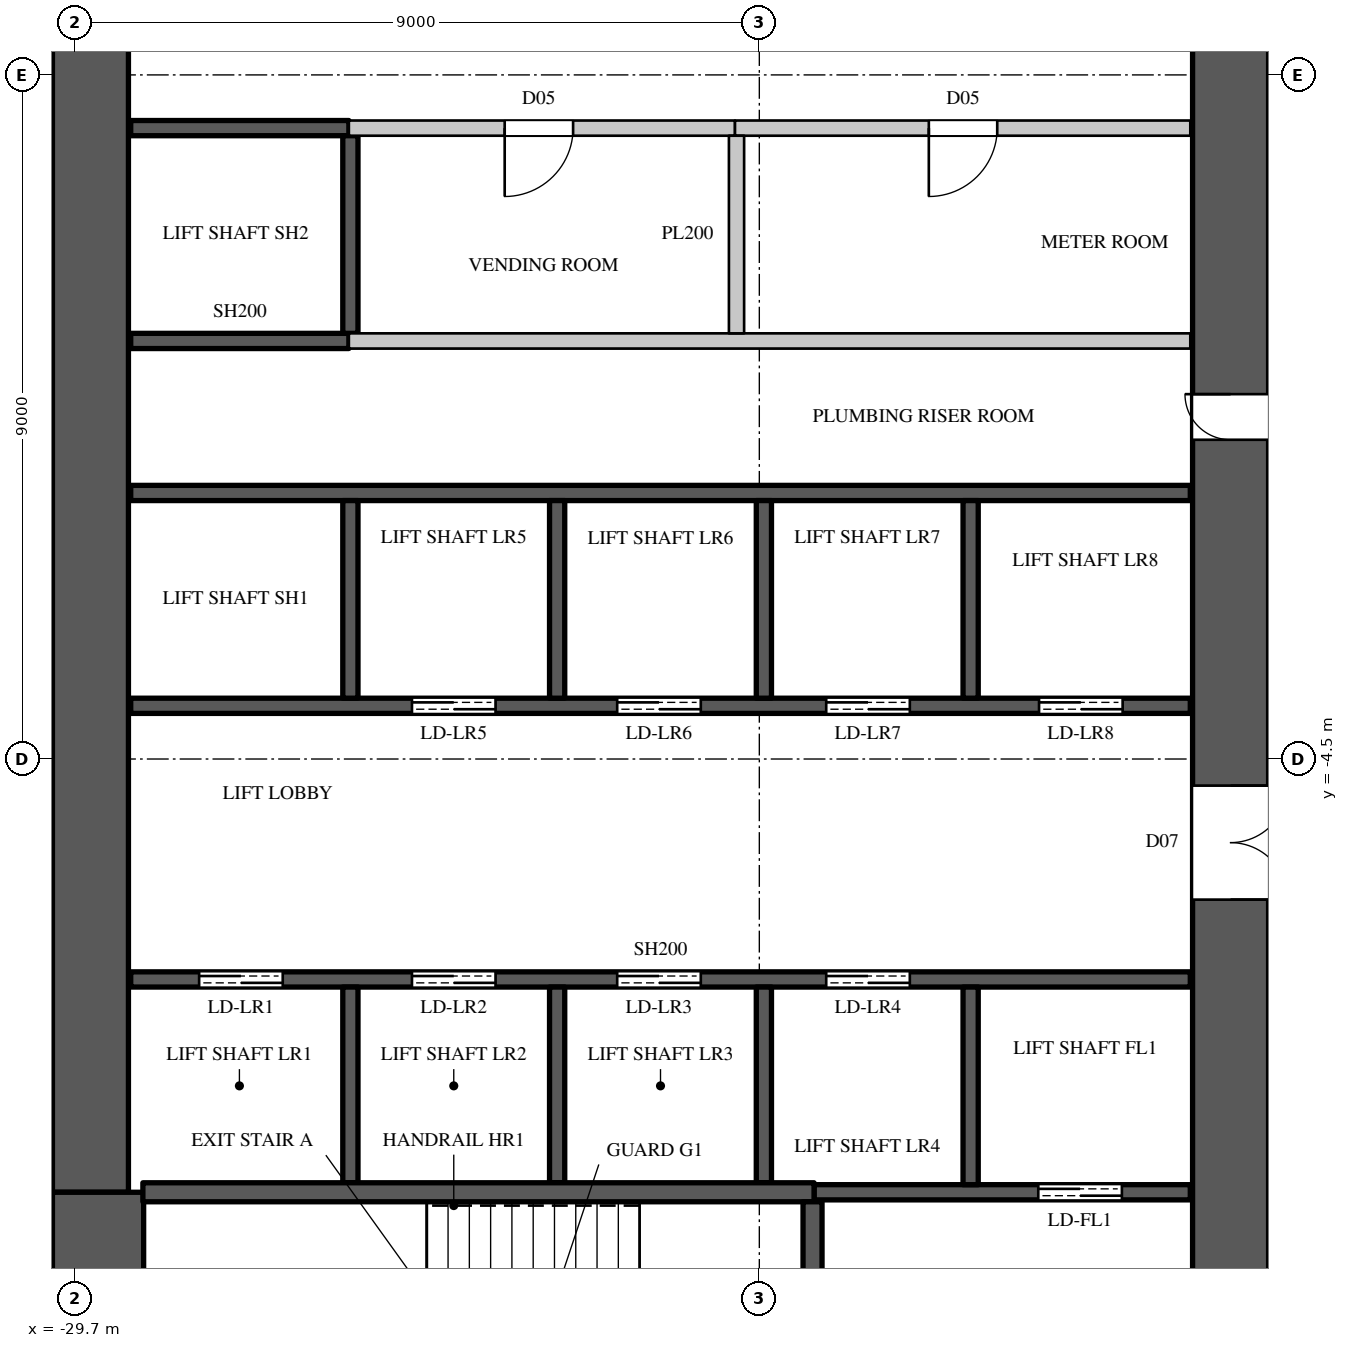
"""IFC4 building model, lengths in metres.
Left out: names, types, materials, properties, quantities, classifications, styles, units other than length and angle.
Written with IfcOpenShell. Run it as: python <this file> out.ifc"""

import sys

from ifc_helpers import new_model, si_unit, direction, frame, frame_2d, origin, place, context, subcontext, project, spatial, rectangle, extrude, element, fill, save


model = new_model("IFC4")
c1 = context("Model", 3, precision=1e-05, world=origin(), true_north=direction((0.0, 1.0)))
c2 = subcontext(c1, "Body", "Model", "MODEL_VIEW")
j1 = project(units=[si_unit("LENGTHUNIT", "METRE"), si_unit("PLANEANGLEUNIT", "RADIAN")], contexts=[c1])
p1 = place(None, origin())
s1 = spatial("IfcSite", under=j1, at=p1, CompositionType="ELEMENT")
p2 = place(p1, origin())
s2 = spatial("IfcBuilding", under=s1, at=p2, CompositionType="ELEMENT")
p3 = place(p2, frame((0.0, 0.0, 62.7)))
s3 = spatial("IfcBuildingStorey", under=s2, at=p3, CompositionType="ELEMENT", Elevation=62.7)
p4 = place(p3, frame((-14.5, -14.8, 0.0), z_axis=(0.0, 0.0, 1.0), x_axis=(0.0, 1.0, 0.0)))
e1 = element("IfcWall", 1, at=p4, inside=s3, PredefinedType="SHEAR", context=c2, shape_type="SweptSolid", body=[
    extrude(rectangle(XDim=29.6, YDim=1.0, at=frame_2d((14.8, 0.0))), origin(), (0.0, 0.0, 1.0), 3.6),
])
p5 = place(p4, frame((8.45, 0.0, 0.0)))
e2 = element("IfcOpeningElement", 2, at=p5, cuts=e1, PredefinedType="OPENING", context=c2, shape_type="SweptSolid", body=[
    extrude(rectangle(XDim=1.5, YDim=2.4, at=frame_2d((0.75, 1.2))), frame((0.0, 0.51, 0.0), z_axis=(0.0, -1.0, 0.0), x_axis=(1.0, 0.0, 0.0)), (0.0, 0.0, 1.0), 1.02),
])
p6 = place(p4, frame((19.65, 0.0, 0.0)))
e3 = element("IfcOpeningElement", 3, at=p6, cuts=e1, PredefinedType="OPENING", context=c2, shape_type="SweptSolid", body=[
    extrude(rectangle(XDim=1.5, YDim=2.4, at=frame_2d((0.75, 1.2))), frame((0.0, 0.51, 0.0), z_axis=(0.0, -1.0, 0.0), x_axis=(1.0, 0.0, 0.0)), (0.0, 0.0, 1.0), 1.02),
])
p7 = place(p4, frame((14.5, 0.0, 0.0)))
e4 = element("IfcOpeningElement", 4, at=p7, cuts=e1, PredefinedType="OPENING", context=c2, shape_type="SweptSolid", body=[
    extrude(rectangle(XDim=0.6, YDim=2.0, at=frame_2d((0.3, 1.0))), frame((0.0, 0.51, 0.0), z_axis=(0.0, -1.0, 0.0), x_axis=(1.0, 0.0, 0.0)), (0.0, 0.0, 1.0), 1.02),
])
p8 = place(p3, frame((-29.5, -10.2, 0.0), z_axis=(0.0, 0.0, 1.0), x_axis=(0.0, 1.0, 0.0)))
e5 = element("IfcWall", 5, at=p8, inside=s3, PredefinedType="SHEAR", context=c2, shape_type="SweptSolid", body=[
    extrude(rectangle(XDim=20.4, YDim=1.0, at=frame_2d((10.2, 0.0))), origin(), (0.0, 0.0, 1.0), 3.6),
])
p9 = place(p3, frame((-29.4, -14.8, 0.0), z_axis=(0.0, 0.0, 1.0), x_axis=(0.0, 1.0, 0.0)))
e6 = element("IfcWall", 6, at=p9, inside=s3, PredefinedType="SHEAR", context=c2, shape_type="SweptSolid", body=[
    extrude(rectangle(XDim=4.6, YDim=1.2, at=frame_2d((2.3, 0.0))), origin(), (0.0, 0.0, 1.0), 3.6),
])
p10 = place(p3, frame((-26.1, 3.8, 0.0), z_axis=(0.0, 0.0, 1.0), x_axis=(1.0, 0.0, 0.0)))
e7 = element("IfcWall", 7, at=p10, inside=s3, PredefinedType="PARTITIONING", context=c2, shape_type="SweptSolid", body=[
    extrude(rectangle(XDim=5.08, YDim=0.2, at=frame_2d((2.54, 0.0))), origin(), (0.0, 0.0, 1.0), 3.3),
])
p11 = place(p10, frame((2.05, 0.0, 0.0)))
e8 = element("IfcOpeningElement", 8, at=p11, cuts=e7, PredefinedType="OPENING", context=c2, shape_type="SweptSolid", body=[
    extrude(rectangle(XDim=0.9, YDim=2.2, at=frame_2d((0.45, 1.1))), frame((0.0, 0.11, 0.0), z_axis=(0.0, -1.0, 0.0), x_axis=(1.0, 0.0, 0.0)), (0.0, 0.0, 1.0), 0.22),
])
p12 = place(p3, frame((-26.1, 1.0, 0.0), z_axis=(0.0, 0.0, 1.0), x_axis=(1.0, 0.0, 0.0)))
e9 = element("IfcWall", 9, at=p12, inside=s3, PredefinedType="PARTITIONING", context=c2, shape_type="SweptSolid", body=[
    extrude(rectangle(XDim=11.07, YDim=0.2, at=frame_2d((5.535, 0.0))), origin(), (0.0, 0.0, 1.0), 3.3),
])
p13 = place(p3, frame((-21.02, 3.8, 0.0), z_axis=(0.0, 0.0, 1.0), x_axis=(1.0, 0.0, 0.0)))
e10 = element("IfcWall", 10, at=p13, inside=s3, PredefinedType="PARTITIONING", context=c2, shape_type="SweptSolid", body=[
    extrude(rectangle(XDim=5.99, YDim=0.2, at=frame_2d((2.995, 0.0))), origin(), (0.0, 0.0, 1.0), 3.3),
])
p14 = place(p13, frame((2.55, 0.0, 0.0)))
e11 = element("IfcOpeningElement", 11, at=p14, cuts=e10, PredefinedType="OPENING", context=c2, shape_type="SweptSolid", body=[
    extrude(rectangle(XDim=0.9, YDim=2.2, at=frame_2d((0.45, 1.1))), frame((0.0, 0.11, 0.0), z_axis=(0.0, -1.0, 0.0), x_axis=(1.0, 0.0, 0.0)), (0.0, 0.0, 1.0), 0.22),
])
p15 = place(p3, frame((-21.0, 1.1, 0.0), z_axis=(0.0, 0.0, 1.0), x_axis=(0.0, 1.0, 0.0)))
e12 = element("IfcWall", 12, at=p15, inside=s3, PredefinedType="PARTITIONING", context=c2, shape_type="SweptSolid", body=[
    extrude(rectangle(XDim=2.6, YDim=0.2, at=frame_2d((1.3, 0.0))), origin(), (0.0, 0.0, 1.0), 3.3),
])
p16 = place(p3, frame((-28.97, -7.4, 0.0), z_axis=(0.0, 0.0, 1.0), x_axis=(1.0, 0.0, 0.0)))
e13 = element("IfcWall", 13, at=p16, inside=s3, PredefinedType="SHEAR", context=c2, shape_type="SweptSolid", body=[
    extrude(rectangle(XDim=13.94, YDim=0.2, at=frame_2d((6.97, 0.0))), origin(), (0.0, 0.0, 1.0), 3.3),
])
p17 = place(p16, frame((0.9, 0.0, 0.0)))
e14 = element("IfcOpeningElement", 14, at=p17, cuts=e13, PredefinedType="OPENING", context=c2, shape_type="SweptSolid", body=[
    extrude(rectangle(XDim=1.1, YDim=2.2, at=frame_2d((0.55, 1.1))), frame((0.0, 0.11, 0.0), z_axis=(0.0, -1.0, 0.0), x_axis=(1.0, 0.0, 0.0)), (0.0, 0.0, 1.0), 0.22),
])
p18 = place(p16, frame((3.7, 0.0, 0.0)))
e15 = element("IfcOpeningElement", 15, at=p18, cuts=e13, PredefinedType="OPENING", context=c2, shape_type="SweptSolid", body=[
    extrude(rectangle(XDim=1.1, YDim=2.2, at=frame_2d((0.55, 1.1))), frame((0.0, 0.11, 0.0), z_axis=(0.0, -1.0, 0.0), x_axis=(1.0, 0.0, 0.0)), (0.0, 0.0, 1.0), 0.22),
])
p19 = place(p16, frame((6.4, 0.0, 0.0)))
e16 = element("IfcOpeningElement", 16, at=p19, cuts=e13, PredefinedType="OPENING", context=c2, shape_type="SweptSolid", body=[
    extrude(rectangle(XDim=1.1, YDim=2.2, at=frame_2d((0.55, 1.1))), frame((0.0, 0.11, 0.0), z_axis=(0.0, -1.0, 0.0), x_axis=(1.0, 0.0, 0.0)), (0.0, 0.0, 1.0), 0.22),
])
p20 = place(p16, frame((9.15, 0.0, 0.0)))
e17 = element("IfcOpeningElement", 17, at=p20, cuts=e13, PredefinedType="OPENING", context=c2, shape_type="SweptSolid", body=[
    extrude(rectangle(XDim=1.1, YDim=2.2, at=frame_2d((0.55, 1.1))), frame((0.0, 0.11, 0.0), z_axis=(0.0, -1.0, 0.0), x_axis=(1.0, 0.0, 0.0)), (0.0, 0.0, 1.0), 0.22),
])
p21 = place(p3, frame((-28.97, -3.8, 0.0), z_axis=(0.0, 0.0, 1.0), x_axis=(1.0, 0.0, 0.0)))
e18 = element("IfcWall", 18, at=p21, inside=s3, PredefinedType="SHEAR", context=c2, shape_type="SweptSolid", body=[
    extrude(rectangle(XDim=13.94, YDim=0.2, at=frame_2d((6.97, 0.0))), origin(), (0.0, 0.0, 1.0), 3.3),
])
p22 = place(p21, frame((3.7, 0.0, 0.0)))
e19 = element("IfcOpeningElement", 19, at=p22, cuts=e18, PredefinedType="OPENING", context=c2, shape_type="SweptSolid", body=[
    extrude(rectangle(XDim=1.1, YDim=2.2, at=frame_2d((0.55, 1.1))), frame((0.0, 0.11, 0.0), z_axis=(0.0, -1.0, 0.0), x_axis=(1.0, 0.0, 0.0)), (0.0, 0.0, 1.0), 0.22),
])
p23 = place(p21, frame((6.4, 0.0, 0.0)))
e20 = element("IfcOpeningElement", 20, at=p23, cuts=e18, PredefinedType="OPENING", context=c2, shape_type="SweptSolid", body=[
    extrude(rectangle(XDim=1.1, YDim=2.2, at=frame_2d((0.55, 1.1))), frame((0.0, 0.11, 0.0), z_axis=(0.0, -1.0, 0.0), x_axis=(1.0, 0.0, 0.0)), (0.0, 0.0, 1.0), 0.22),
])
p24 = place(p21, frame((9.15, 0.0, 0.0)))
e21 = element("IfcOpeningElement", 21, at=p24, cuts=e18, PredefinedType="OPENING", context=c2, shape_type="SweptSolid", body=[
    extrude(rectangle(XDim=1.1, YDim=2.2, at=frame_2d((0.55, 1.1))), frame((0.0, 0.11, 0.0), z_axis=(0.0, -1.0, 0.0), x_axis=(1.0, 0.0, 0.0)), (0.0, 0.0, 1.0), 0.22),
])
p25 = place(p21, frame((11.95, 0.0, 0.0)))
e22 = element("IfcOpeningElement", 22, at=p25, cuts=e18, PredefinedType="OPENING", context=c2, shape_type="SweptSolid", body=[
    extrude(rectangle(XDim=1.1, YDim=2.2, at=frame_2d((0.55, 1.1))), frame((0.0, 0.11, 0.0), z_axis=(0.0, -1.0, 0.0), x_axis=(1.0, 0.0, 0.0)), (0.0, 0.0, 1.0), 0.22),
])
p26 = place(p3, frame((-28.97, -1.0, 0.0), z_axis=(0.0, 0.0, 1.0), x_axis=(1.0, 0.0, 0.0)))
e23 = element("IfcWall", 23, at=p26, inside=s3, PredefinedType="SHEAR", context=c2, shape_type="SweptSolid", body=[
    extrude(rectangle(XDim=13.94, YDim=0.2, at=frame_2d((6.97, 0.0))), origin(), (0.0, 0.0, 1.0), 3.3),
])
for number, where, z_axis, x_axis in (
    (24, (-28.97, 1.0, 0.0), (0.0, 0.0, 1.0), (1.0, 0.0, 0.0)),
    (25, (-28.97, 3.8, 0.0), (0.0, 0.0, 1.0), (1.0, 0.0, 0.0)),
):
    element("IfcWall", number, at=place(p3, frame(where, z_axis=z_axis, x_axis=x_axis)), inside=s3, PredefinedType="SHEAR", context=c2, shape_type="SweptSolid", body=[
        extrude(rectangle(XDim=2.87, YDim=0.2, at=frame_2d((1.435, 0.0))), origin(), (0.0, 0.0, 1.0), 3.3),
    ])
p27 = place(p3, frame((-26.08, -10.075, 0.0), z_axis=(0.0, 0.0, 1.0), x_axis=(0.0, 1.0, 0.0)))
e26 = element("IfcWall", 26, at=p27, inside=s3, PredefinedType="SHEAR", context=c2, shape_type="SweptSolid", body=[
    extrude(rectangle(XDim=2.575, YDim=0.2, at=frame_2d((1.288, 0.0))), origin(), (0.0, 0.0, 1.0), 3.6),
])
p28 = place(p3, frame((-26.08, -3.7, 0.0), z_axis=(0.0, 0.0, 1.0), x_axis=(0.0, 1.0, 0.0)))
e27 = element("IfcWall", 27, at=p28, inside=s3, PredefinedType="SHEAR", context=c2, shape_type="SweptSolid", body=[
    extrude(rectangle(XDim=2.6, YDim=0.2, at=frame_2d((1.3, 0.0))), origin(), (0.0, 0.0, 1.0), 3.6),
])
p29 = place(p3, frame((-26.08, 1.1, 0.0), z_axis=(0.0, 0.0, 1.0), x_axis=(0.0, 1.0, 0.0)))
e28 = element("IfcWall", 28, at=p29, inside=s3, PredefinedType="SHEAR", context=c2, shape_type="SweptSolid", body=[
    extrude(rectangle(XDim=2.6, YDim=0.2, at=frame_2d((1.3, 0.0))), origin(), (0.0, 0.0, 1.0), 3.3),
])
p30 = place(p3, frame((-23.36, -10.075, 0.0), z_axis=(0.0, 0.0, 1.0), x_axis=(0.0, 1.0, 0.0)))
e29 = element("IfcWall", 29, at=p30, inside=s3, PredefinedType="SHEAR", context=c2, shape_type="SweptSolid", body=[
    extrude(rectangle(XDim=2.575, YDim=0.2, at=frame_2d((1.288, 0.0))), origin(), (0.0, 0.0, 1.0), 3.6),
])
p31 = place(p3, frame((-23.36, -3.7, 0.0), z_axis=(0.0, 0.0, 1.0), x_axis=(0.0, 1.0, 0.0)))
e30 = element("IfcWall", 30, at=p31, inside=s3, PredefinedType="SHEAR", context=c2, shape_type="SweptSolid", body=[
    extrude(rectangle(XDim=2.6, YDim=0.2, at=frame_2d((1.3, 0.0))), origin(), (0.0, 0.0, 1.0), 3.6),
])
p32 = place(p3, frame((-20.64, -10.075, 0.0), z_axis=(0.0, 0.0, 1.0), x_axis=(0.0, 1.0, 0.0)))
e31 = element("IfcWall", 31, at=p32, inside=s3, PredefinedType="SHEAR", context=c2, shape_type="SweptSolid", body=[
    extrude(rectangle(XDim=2.575, YDim=0.2, at=frame_2d((1.288, 0.0))), origin(), (0.0, 0.0, 1.0), 3.6),
])
p33 = place(p3, frame((-20.64, -3.7, 0.0), z_axis=(0.0, 0.0, 1.0), x_axis=(0.0, 1.0, 0.0)))
e32 = element("IfcWall", 32, at=p33, inside=s3, PredefinedType="SHEAR", context=c2, shape_type="SweptSolid", body=[
    extrude(rectangle(XDim=2.6, YDim=0.2, at=frame_2d((1.3, 0.0))), origin(), (0.0, 0.0, 1.0), 3.6),
])
p34 = place(p3, frame((-19.98, -10.2, 0.0), z_axis=(0.0, 0.0, 1.0), x_axis=(1.0, 0.0, 0.0)))
e33 = element("IfcWall", 33, at=p34, inside=s3, PredefinedType="SHEAR", context=c2, shape_type="SweptSolid", body=[
    extrude(rectangle(XDim=4.95, YDim=0.2, at=frame_2d((2.475, 0.0))), origin(), (0.0, 0.0, 1.0), 3.3),
])
p35 = place(p34, frame((2.95, 0.0, 0.0)))
e34 = element("IfcOpeningElement", 34, at=p35, cuts=e33, PredefinedType="OPENING", context=c2, shape_type="SweptSolid", body=[
    extrude(rectangle(XDim=1.1, YDim=2.2, at=frame_2d((0.55, 1.1))), frame((0.0, 0.11, 0.0), z_axis=(0.0, -1.0, 0.0), x_axis=(1.0, 0.0, 0.0)), (0.0, 0.0, 1.0), 0.22),
])
p36 = place(p3, frame((-17.92, -10.1, 0.0), z_axis=(0.0, 0.0, 1.0), x_axis=(0.0, 1.0, 0.0)))
e35 = element("IfcWall", 35, at=p36, inside=s3, PredefinedType="SHEAR", context=c2, shape_type="SweptSolid", body=[
    extrude(rectangle(XDim=2.6, YDim=0.2, at=frame_2d((1.3, 0.0))), origin(), (0.0, 0.0, 1.0), 3.6),
])
p37 = place(p3, frame((-17.92, -3.7, 0.0), z_axis=(0.0, 0.0, 1.0), x_axis=(0.0, 1.0, 0.0)))
e36 = element("IfcWall", 36, at=p37, inside=s3, PredefinedType="SHEAR", context=c2, shape_type="SweptSolid", body=[
    extrude(rectangle(XDim=2.6, YDim=0.2, at=frame_2d((1.3, 0.0))), origin(), (0.0, 0.0, 1.0), 3.6),
])
p38 = place(p3, frame((-28.81, -10.2, 0.0), z_axis=(0.0, 0.0, 1.0), x_axis=(1.0, 0.0, 0.0)))
e37 = element("IfcWall", 37, at=p38, inside=s3, PredefinedType="SHEAR", context=c2, shape_type="SweptSolid", body=[
    extrude(rectangle(XDim=8.83, YDim=0.25, at=frame_2d((4.415, 0.0))), origin(), (0.0, 0.0, 1.0), 3.3),
])
p39 = place(p3, frame((-20.0, -14.77, 0.0), z_axis=(0.0, 0.0, 1.0), x_axis=(0.0, 1.0, 0.0)))
e38 = element("IfcWall", 38, at=p39, inside=s3, PredefinedType="SHEAR", context=c2, shape_type="SweptSolid", body=[
    extrude(rectangle(XDim=4.445, YDim=0.25, at=frame_2d((2.223, 0.0))), origin(), (0.0, 0.0, 1.0), 3.3),
])
p40 = place(p39, frame((1.7, 0.0, 0.0)))
e39 = element("IfcOpeningElement", 39, at=p40, cuts=e38, PredefinedType="OPENING", context=c2, shape_type="SweptSolid", body=[
    extrude(rectangle(XDim=1.1, YDim=2.2, at=frame_2d((0.55, 1.1))), frame((0.0, 0.135, 0.0), z_axis=(0.0, -1.0, 0.0), x_axis=(1.0, 0.0, 0.0)), (0.0, 0.0, 1.0), 0.27),
])
p41 = place(p11, origin())
e40 = element("IfcDoor", 40, at=p41, inside=s3, OperationType="SINGLE_SWING_RIGHT", PredefinedType="DOOR", context=c2, shape_type="SweptSolid", body=[
    extrude(rectangle(XDim=0.9, YDim=2.2, at=frame_2d((0.45, 1.1))), frame((0.0, 0.025, 0.0), z_axis=(0.0, -1.0, 0.0), x_axis=(1.0, 0.0, 0.0)), (0.0, 0.0, 1.0), 0.05),
])
fill(e8, e40)
p42 = place(p14, origin())
e41 = element("IfcDoor", 41, at=p42, inside=s3, OperationType="SINGLE_SWING_RIGHT", PredefinedType="DOOR", context=c2, shape_type="SweptSolid", body=[
    extrude(rectangle(XDim=0.9, YDim=2.2, at=frame_2d((0.45, 1.1))), frame((0.0, 0.025, 0.0), z_axis=(0.0, -1.0, 0.0), x_axis=(1.0, 0.0, 0.0)), (0.0, 0.0, 1.0), 0.05),
])
fill(e11, e41)
p43 = place(p17, origin())
e42 = element("IfcDoor", 42, at=p43, inside=s3, OperationType="DOUBLE_DOOR_SLIDING", PredefinedType="DOOR", context=c2, shape_type="SweptSolid", body=[
    extrude(rectangle(XDim=1.1, YDim=2.2, at=frame_2d((0.55, 1.1))), frame((0.0, 0.025, 0.0), z_axis=(0.0, -1.0, 0.0), x_axis=(1.0, 0.0, 0.0)), (0.0, 0.0, 1.0), 0.05),
])
fill(e14, e42)
p44 = place(p18, origin())
e43 = element("IfcDoor", 43, at=p44, inside=s3, OperationType="DOUBLE_DOOR_SLIDING", PredefinedType="DOOR", context=c2, shape_type="SweptSolid", body=[
    extrude(rectangle(XDim=1.1, YDim=2.2, at=frame_2d((0.55, 1.1))), frame((0.0, 0.025, 0.0), z_axis=(0.0, -1.0, 0.0), x_axis=(1.0, 0.0, 0.0)), (0.0, 0.0, 1.0), 0.05),
])
fill(e15, e43)
p45 = place(p19, origin())
e44 = element("IfcDoor", 44, at=p45, inside=s3, OperationType="DOUBLE_DOOR_SLIDING", PredefinedType="DOOR", context=c2, shape_type="SweptSolid", body=[
    extrude(rectangle(XDim=1.1, YDim=2.2, at=frame_2d((0.55, 1.1))), frame((0.0, 0.025, 0.0), z_axis=(0.0, -1.0, 0.0), x_axis=(1.0, 0.0, 0.0)), (0.0, 0.0, 1.0), 0.05),
])
fill(e16, e44)
p46 = place(p20, origin())
e45 = element("IfcDoor", 45, at=p46, inside=s3, OperationType="DOUBLE_DOOR_SLIDING", PredefinedType="DOOR", context=c2, shape_type="SweptSolid", body=[
    extrude(rectangle(XDim=1.1, YDim=2.2, at=frame_2d((0.55, 1.1))), frame((0.0, 0.025, 0.0), z_axis=(0.0, -1.0, 0.0), x_axis=(1.0, 0.0, 0.0)), (0.0, 0.0, 1.0), 0.05),
])
fill(e17, e45)
p47 = place(p35, origin())
e46 = element("IfcDoor", 46, at=p47, inside=s3, OperationType="DOUBLE_DOOR_SLIDING", PredefinedType="DOOR", context=c2, shape_type="SweptSolid", body=[
    extrude(rectangle(XDim=1.1, YDim=2.2, at=frame_2d((0.55, 1.1))), frame((0.0, 0.025, 0.0), z_axis=(0.0, -1.0, 0.0), x_axis=(1.0, 0.0, 0.0)), (0.0, 0.0, 1.0), 0.05),
])
fill(e34, e46)
p48 = place(p22, origin())
e47 = element("IfcDoor", 47, at=p48, inside=s3, OperationType="DOUBLE_DOOR_SLIDING", PredefinedType="DOOR", context=c2, shape_type="SweptSolid", body=[
    extrude(rectangle(XDim=1.1, YDim=2.2, at=frame_2d((0.55, 1.1))), frame((0.0, 0.025, 0.0), z_axis=(0.0, -1.0, 0.0), x_axis=(1.0, 0.0, 0.0)), (0.0, 0.0, 1.0), 0.05),
])
fill(e19, e47)
p49 = place(p23, origin())
e48 = element("IfcDoor", 48, at=p49, inside=s3, OperationType="DOUBLE_DOOR_SLIDING", PredefinedType="DOOR", context=c2, shape_type="SweptSolid", body=[
    extrude(rectangle(XDim=1.1, YDim=2.2, at=frame_2d((0.55, 1.1))), frame((0.0, 0.025, 0.0), z_axis=(0.0, -1.0, 0.0), x_axis=(1.0, 0.0, 0.0)), (0.0, 0.0, 1.0), 0.05),
])
fill(e20, e48)
p50 = place(p24, origin())
e49 = element("IfcDoor", 49, at=p50, inside=s3, OperationType="DOUBLE_DOOR_SLIDING", PredefinedType="DOOR", context=c2, shape_type="SweptSolid", body=[
    extrude(rectangle(XDim=1.1, YDim=2.2, at=frame_2d((0.55, 1.1))), frame((0.0, 0.025, 0.0), z_axis=(0.0, -1.0, 0.0), x_axis=(1.0, 0.0, 0.0)), (0.0, 0.0, 1.0), 0.05),
])
fill(e21, e49)
p51 = place(p25, origin())
e50 = element("IfcDoor", 50, at=p51, inside=s3, OperationType="DOUBLE_DOOR_SLIDING", PredefinedType="DOOR", context=c2, shape_type="SweptSolid", body=[
    extrude(rectangle(XDim=1.1, YDim=2.2, at=frame_2d((0.55, 1.1))), frame((0.0, 0.025, 0.0), z_axis=(0.0, -1.0, 0.0), x_axis=(1.0, 0.0, 0.0)), (0.0, 0.0, 1.0), 0.05),
])
fill(e22, e50)
p52 = place(p5, origin())
e51 = element("IfcDoor", 51, at=p52, inside=s3, OperationType="DOUBLE_DOOR_SINGLE_SWING", PredefinedType="DOOR", context=c2, shape_type="SweptSolid", body=[
    extrude(rectangle(XDim=1.5, YDim=2.4, at=frame_2d((0.75, 1.2))), frame((0.0, -0.445, 0.0), z_axis=(0.0, -1.0, 0.0), x_axis=(1.0, 0.0, 0.0)), (0.0, 0.0, 1.0), 0.05),
])
fill(e2, e51)
p53 = place(p7, origin())
e52 = element("IfcDoor", 52, at=p53, inside=s3, OperationType="SINGLE_SWING_RIGHT", PredefinedType="DOOR", context=c2, shape_type="SweptSolid", body=[
    extrude(rectangle(XDim=0.6, YDim=2.0, at=frame_2d((0.3, 1.0))), frame((0.0, 0.495, 0.0), z_axis=(0.0, -1.0, 0.0), x_axis=(1.0, 0.0, 0.0)), (0.0, 0.0, 1.0), 0.05),
])
fill(e4, e52)
save(model, sys.argv[1])
